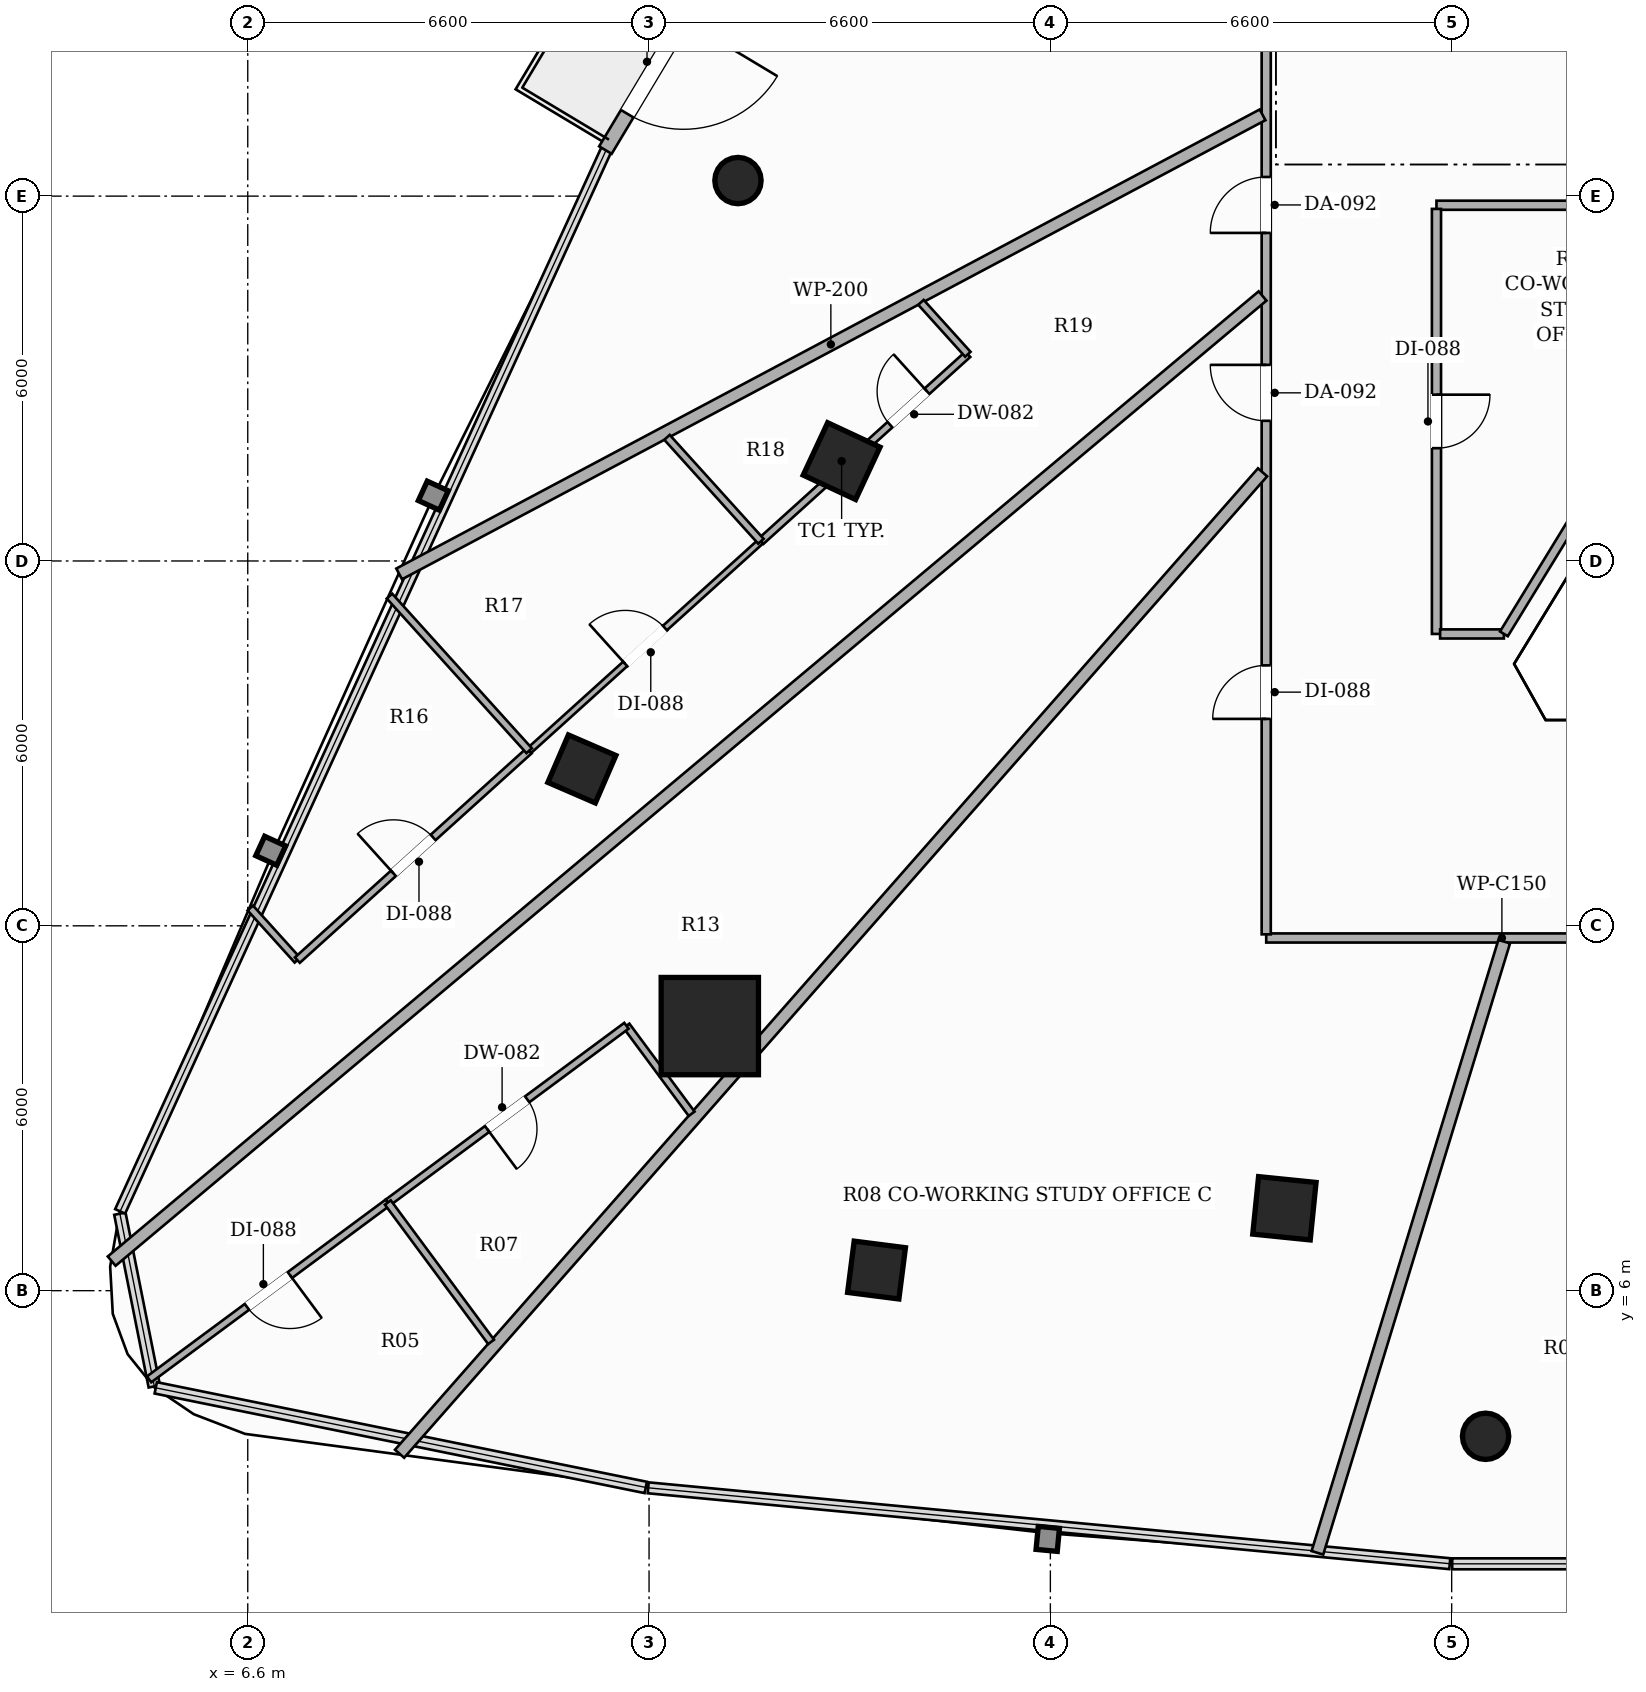
"""IFC4 building model, lengths in metres.
Left out: names, types, materials, properties, quantities, classifications, styles, units other than length and angle.
Written with IfcOpenShell. Run it as: python <this file> out.ifc"""

import sys

from ifc_helpers import new_model, si_unit, direction, frame, frame_2d, origin, origin_2d, place, context, subcontext, project, spatial, rectangle, hollow_rectangle, hollow_circle, extrude, element, fill, save


model = new_model("IFC4")
c1 = context("Model", 3, precision=1e-05, world=origin(), true_north=direction((0.0, 1.0)))
c2 = subcontext(c1, "Body", "Model", "MODEL_VIEW")
j1 = project(units=[si_unit("LENGTHUNIT", "METRE"), si_unit("PLANEANGLEUNIT", "RADIAN")], contexts=[c1])
p1 = place(None, origin())
s1 = spatial("IfcSite", under=j1, at=p1, CompositionType="ELEMENT")
p2 = place(p1, origin())
s2 = spatial("IfcBuilding", under=s1, at=p2, CompositionType="ELEMENT")
p3 = place(p2, frame((0.0, 0.0, 50.0)))
s3 = spatial("IfcBuildingStorey", under=s2, at=p3, CompositionType="ELEMENT", Elevation=50.0)
p4 = place(p3, frame((14.199, 10.351, 0.0), z_axis=(0.0, 0.0, 1.0), x_axis=(1.0, 0.0, 0.0)))
e1 = element("IfcColumn", 1, at=p4, inside=s3, PredefinedType="COLUMN", context=c2, shape_type="SweptSolid", body=[
    extrude(hollow_rectangle(XDim=1.6, YDim=1.6, WallThickness=0.05, at=origin_2d()), origin(), (0.0, 0.0, 1.0), 3.3),
])
for number, where, z_axis, x_axis in (
    (2, (16.367, 19.642, 0.0), (0.0, 0.0, 1.0), (0.423, 0.906, 0.0)),
    (3, (23.649, 7.355, 0.0), (0.0, 0.0, 1.0), (-0.995, 0.101, 0.0)),
):
    element("IfcColumn", number, at=place(p3, frame(where, z_axis=z_axis, x_axis=x_axis)), inside=s3, PredefinedType="COLUMN", context=c2, shape_type="SweptSolid", body=[
        extrude(hollow_rectangle(XDim=0.95, YDim=0.95, WallThickness=0.032, at=origin_2d()), origin(), (0.0, 0.0, 1.0), 3.3),
    ])
for number, where, z_axis, x_axis in (
    (4, (12.095, 14.58, 0.0), (0.0, 0.0, 1.0), (0.397, 0.918, 0.0)),
    (5, (16.941, 6.339, 0.0), (0.0, 0.0, 1.0), (-0.992, 0.127, 0.0)),
):
    element("IfcColumn", number, at=place(p3, frame(where, z_axis=z_axis, x_axis=x_axis)), inside=s3, PredefinedType="COLUMN", context=c2, shape_type="SweptSolid", body=[
        extrude(hollow_rectangle(XDim=0.85, YDim=0.85, WallThickness=0.028, at=origin_2d()), origin(), (0.0, 0.0, 1.0), 3.3),
    ])
for number, where, z_axis, x_axis in (
    (6, (14.662, 24.256, 0.0), (0.0, 0.0, 1.0), (1.0, 0.0, 0.0)),
    (7, (26.958, 3.605, 0.0), (0.0, 0.0, 1.0), (1.0, 0.0, 0.0)),
):
    element("IfcColumn", number, at=place(p3, frame(where, z_axis=z_axis, x_axis=x_axis)), inside=s3, PredefinedType="COLUMN", context=c2, shape_type="SweptSolid", body=[
        extrude(hollow_circle(Radius=0.381, WallThickness=0.022, at=origin_2d()), origin(), (0.0, 0.0, 1.0), 3.3),
    ])
p5 = place(p3, frame((19.162, 35.896, 0.0), z_axis=(0.0, 0.0, 1.0), x_axis=(-0.514316069528, -0.857600711652, 0.0)))
e8 = element("IfcWall", 8, at=p5, inside=s3, PredefinedType="SOLIDWALL", context=c2, shape_type="SweptSolid", body=[
    extrude(rectangle(XDim=12.989, YDim=0.24, at=frame_2d((6.494, 0.0))), origin(), (0.0, 0.0, 1.0), 2.624),
])
p6 = place(p5, frame((10.491, 0.0, 0.0)))
e9 = element("IfcOpeningElement", 9, at=p6, cuts=e8, PredefinedType="OPENING", context=c2, shape_type="SweptSolid", body=[
    extrude(rectangle(XDim=1.8, YDim=2.2, at=frame_2d((0.9, 1.1))), frame((0.0, 0.13, 0.0), z_axis=(0.0, -1.0, 0.0), x_axis=(1.0, 0.0, 0.0)), (0.0, 0.0, 1.0), 0.26),
])
p7 = place(p3, frame((42.59, 11.8, 0.0), z_axis=(0.0, 0.0, 1.0), x_axis=(-1.0, 0.0, 0.0)))
e10 = element("IfcWall", 10, at=p7, inside=s3, PredefinedType="PARTITIONING", context=c2, shape_type="SweptSolid", body=[
    extrude(rectangle(XDim=19.24, YDim=0.15, at=frame_2d((9.62, 0.0))), origin(), (0.0, 0.0, 1.0), 2.669),
])
p8 = place(p7, frame((10.508, 0.0, 0.0)))
e11 = element("IfcOpeningElement", 11, at=p8, cuts=e10, PredefinedType="OPENING", context=c2, shape_type="SweptSolid", body=[
    extrude(rectangle(XDim=0.88, YDim=2.1, at=frame_2d((0.44, 1.05))), frame((0.0, 0.085, 0.0), z_axis=(0.0, -1.0, 0.0), x_axis=(1.0, 0.0, 0.0)), (0.0, 0.0, 1.0), 0.17),
])
p9 = place(p7, frame((2.98, 0.0, 0.0)))
e12 = element("IfcOpeningElement", 12, at=p9, cuts=e10, PredefinedType="OPENING", context=c2, shape_type="SweptSolid", body=[
    extrude(rectangle(XDim=0.92, YDim=2.15, at=frame_2d((0.46, 1.075))), frame((0.0, 0.085, 0.0), z_axis=(0.0, -1.0, 0.0), x_axis=(1.0, 0.0, 0.0)), (0.0, 0.0, 1.0), 0.17),
])
p10 = place(p3, frame((23.35, 11.86, 0.0), z_axis=(0.0, 0.0, 1.0), x_axis=(0.0, 1.0, 0.0)))
e13 = element("IfcWall", 13, at=p10, inside=s3, PredefinedType="PARTITIONING", context=c2, shape_type="SweptSolid", body=[
    extrude(rectangle(XDim=25.04, YDim=0.15, at=frame_2d((12.52, 0.0))), origin(), (0.0, 0.0, 1.0), 2.413),
])
p11 = place(p10, frame((18.67, 0.0, 0.0)))
e14 = element("IfcOpeningElement", 14, at=p11, cuts=e13, PredefinedType="OPENING", context=c2, shape_type="SweptSolid", body=[
    extrude(rectangle(XDim=0.88, YDim=2.1, at=frame_2d((0.44, 1.05))), frame((0.0, 0.085, 0.0), z_axis=(0.0, -1.0, 0.0), x_axis=(1.0, 0.0, 0.0)), (0.0, 0.0, 1.0), 0.17),
])
p12 = place(p10, frame((3.543, 0.0, 0.0)))
e15 = element("IfcOpeningElement", 15, at=p12, cuts=e13, PredefinedType="OPENING", context=c2, shape_type="SweptSolid", body=[
    extrude(rectangle(XDim=0.88, YDim=2.1, at=frame_2d((0.44, 1.05))), frame((0.0, 0.085, 0.0), z_axis=(0.0, -1.0, 0.0), x_axis=(1.0, 0.0, 0.0)), (0.0, 0.0, 1.0), 0.17),
])
p13 = place(p10, frame((8.445, 0.0, 0.0)))
e16 = element("IfcOpeningElement", 16, at=p13, cuts=e13, PredefinedType="OPENING", context=c2, shape_type="SweptSolid", body=[
    extrude(rectangle(XDim=0.92, YDim=2.15, at=frame_2d((0.46, 1.075))), frame((0.0, 0.085, 0.0), z_axis=(0.0, -1.0, 0.0), x_axis=(1.0, 0.0, 0.0)), (0.0, 0.0, 1.0), 0.17),
])
p14 = place(p10, frame((11.535, 0.0, 0.0)))
e17 = element("IfcOpeningElement", 17, at=p14, cuts=e13, PredefinedType="OPENING", context=c2, shape_type="SweptSolid", body=[
    extrude(rectangle(XDim=0.92, YDim=2.15, at=frame_2d((0.46, 1.075))), frame((0.0, 0.085, 0.0), z_axis=(0.0, -1.0, 0.0), x_axis=(1.0, 0.0, 0.0)), (0.0, 0.0, 1.0), 0.17),
])
p15 = place(p3, frame((31.568, 23.85, 0.0), z_axis=(0.0, 0.0, 1.0), x_axis=(-1.0, 0.0, 0.0)))
e18 = element("IfcWall", 18, at=p15, inside=s3, PredefinedType="PARTITIONING", context=c2, shape_type="SweptSolid", body=[
    extrude(rectangle(XDim=5.418, YDim=0.15, at=frame_2d((2.709, 0.0))), origin(), (0.0, 0.0, 1.0), 2.669),
])
p16 = place(p3, frame((26.15, 23.79, 0.0), z_axis=(0.0, 0.0, 1.0), x_axis=(0.0, -1.0, 0.0)))
e19 = element("IfcWall", 19, at=p16, inside=s3, PredefinedType="PARTITIONING", context=c2, shape_type="SweptSolid", body=[
    extrude(rectangle(XDim=6.99, YDim=0.15, at=frame_2d((3.495, 0.0))), origin(), (0.0, 0.0, 1.0), 2.669),
])
p17 = place(p16, frame((3.055, 0.0, 0.0)))
e20 = element("IfcOpeningElement", 20, at=p17, cuts=e19, PredefinedType="OPENING", context=c2, shape_type="SweptSolid", body=[
    extrude(rectangle(XDim=0.88, YDim=2.1, at=frame_2d((0.44, 1.05))), frame((0.0, 0.085, 0.0), z_axis=(0.0, -1.0, 0.0), x_axis=(1.0, 0.0, 0.0)), (0.0, 0.0, 1.0), 0.17),
])
p18 = place(p3, frame((26.21, 16.8, 0.0), z_axis=(0.0, 0.0, 1.0), x_axis=(1.0, 0.0, 0.0)))
e21 = element("IfcWall", 21, at=p18, inside=s3, PredefinedType="PARTITIONING", context=c2, shape_type="SweptSolid", body=[
    extrude(rectangle(XDim=1.049, YDim=0.15, at=frame_2d((0.524, 0.0))), origin(), (0.0, 0.0, 1.0), 3.06),
])
p19 = place(p3, frame((27.259, 16.801, 0.0), z_axis=(0.0, 0.0, 1.0), x_axis=(0.522072924527, 0.852900850906, 0.0)))
e22 = element("IfcWall", 22, at=p19, inside=s3, PredefinedType="PARTITIONING", context=c2, shape_type="SweptSolid", body=[
    extrude(rectangle(XDim=8.194, YDim=0.15, at=frame_2d((4.097, 0.0))), origin(), (0.0, 0.0, 1.0), 2.669),
])
p20 = place(p3, frame((23.29, 25.337, 0.0), z_axis=(0.0, 0.0, 1.0), x_axis=(-0.882959018112, -0.469450074379, 0.0)))
e23 = element("IfcWall", 23, at=p20, inside=s3, PredefinedType="PARTITIONING", context=c2, shape_type="SweptSolid", body=[
    extrude(rectangle(XDim=16.082, YDim=0.2, at=frame_2d((8.041, 0.0))), origin(), (0.0, 0.0, 1.0), 2.413),
])
p21 = place(p3, frame((27.264, 11.74, 0.0), z_axis=(0.0, 0.0, 1.0), x_axis=(-0.292294665238, -0.956328305904, 0.0)))
e24 = element("IfcWall", 24, at=p21, inside=s3, PredefinedType="PARTITIONING", context=c2, shape_type="SweptSolid", body=[
    extrude(rectangle(XDim=10.51, YDim=0.2, at=frame_2d((5.255, 0.0))), origin(), (0.0, 0.0, 1.0), 2.413),
])
p22 = place(p3, frame((9.097, 3.318, 0.0), z_axis=(0.0, 0.0, 1.0), x_axis=(0.66036589704, 0.750943993935, 0.0)))
e25 = element("IfcWall", 25, at=p22, inside=s3, PredefinedType="PARTITIONING", context=c2, shape_type="SweptSolid", body=[
    extrude(rectangle(XDim=21.493, YDim=0.2, at=frame_2d((10.747, 0.0))), origin(), (0.0, 0.0, 1.0), 2.413),
])
p23 = place(p3, frame((4.362, 6.486, 0.0), z_axis=(0.0, 0.0, 1.0), x_axis=(0.766256370513, 0.642534959865, 0.0)))
e26 = element("IfcWall", 26, at=p23, inside=s3, PredefinedType="PARTITIONING", context=c2, shape_type="SweptSolid", body=[
    extrude(rectangle(XDim=24.702, YDim=0.2, at=frame_2d((12.351, 0.0))), origin(), (0.0, 0.0, 1.0), 2.413),
])
p24 = place(p3, frame((13.9, 8.909, 0.0), z_axis=(0.0, 0.0, 1.0), x_axis=(-0.595282665334, 0.803516364708, 0.0)))
e27 = element("IfcWall", 27, at=p24, inside=s3, PredefinedType="PARTITIONING", context=c2, shape_type="SweptSolid", body=[
    extrude(rectangle(XDim=1.801, YDim=0.12, at=frame_2d((0.9, 0.0))), origin(), (0.0, 0.0, 1.0), 3.06),
])
p25 = place(p3, frame((12.828, 10.356, 0.0), z_axis=(0.0, 0.0, 1.0), x_axis=(-0.803609449498, -0.595156998344, 0.0)))
e28 = element("IfcWall", 28, at=p25, inside=s3, PredefinedType="PARTITIONING", context=c2, shape_type="SweptSolid", body=[
    extrude(rectangle(XDim=4.883, YDim=0.12, at=frame_2d((2.441, 0.0))), origin(), (0.0, 0.0, 1.0), 2.619),
])
p26 = place(p25, frame((2.031, 0.0, 0.0)))
e29 = element("IfcOpeningElement", 29, at=p26, cuts=e28, PredefinedType="OPENING", context=c2, shape_type="SweptSolid", body=[
    extrude(rectangle(XDim=0.82, YDim=2.1, at=frame_2d((0.41, 1.05))), frame((0.0, 0.07, 0.0), z_axis=(0.0, -1.0, 0.0), x_axis=(1.0, 0.0, 0.0)), (0.0, 0.0, 1.0), 0.14),
])
p27 = place(p3, frame((8.904, 7.45, 0.0), z_axis=(0.0, 0.0, 1.0), x_axis=(-0.803552768464, -0.595233524168, 0.0)))
e30 = element("IfcWall", 30, at=p27, inside=s3, PredefinedType="PARTITIONING", context=c2, shape_type="SweptSolid", body=[
    extrude(rectangle(XDim=4.887, YDim=0.12, at=frame_2d((2.443, 0.0))), origin(), (0.0, 0.0, 1.0), 3.06),
])
p28 = place(p27, frame((2.004, 0.0, 0.0)))
e31 = element("IfcOpeningElement", 31, at=p28, cuts=e30, PredefinedType="OPENING", context=c2, shape_type="SweptSolid", body=[
    extrude(rectangle(XDim=0.88, YDim=2.1, at=frame_2d((0.44, 1.05))), frame((0.0, 0.07, 0.0), z_axis=(0.0, -1.0, 0.0), x_axis=(1.0, 0.0, 0.0)), (0.0, 0.0, 1.0), 0.14),
])
p29 = place(p3, frame((10.602, 5.158, 0.0), z_axis=(0.0, 0.0, 1.0), x_axis=(-0.595278721497, 0.803519286472, 0.0)))
e32 = element("IfcWall", 32, at=p29, inside=s3, PredefinedType="PARTITIONING", context=c2, shape_type="SweptSolid", body=[
    extrude(rectangle(XDim=2.853, YDim=0.12, at=frame_2d((1.426, 0.0))), origin(), (0.0, 0.0, 1.0), 3.06),
])
p30 = place(p3, frame((15.04, 18.324, 0.0), z_axis=(0.0, 0.0, 1.0), x_axis=(0.741971948415, 0.670430926916, 0.0)))
e33 = element("IfcWall", 33, at=p30, inside=s3, PredefinedType="PARTITIONING", context=c2, shape_type="SweptSolid", body=[
    extrude(rectangle(XDim=4.586, YDim=0.12, at=frame_2d((2.293, 0.0))), origin(), (0.0, 0.0, 1.0), 2.413),
])
p31 = place(p30, frame((2.86, 0.0, 0.0)))
e34 = element("IfcOpeningElement", 34, at=p31, cuts=e33, PredefinedType="OPENING", context=c2, shape_type="SweptSolid", body=[
    extrude(rectangle(XDim=0.82, YDim=2.1, at=frame_2d((0.41, 1.05))), frame((0.0, 0.07, 0.0), z_axis=(0.0, -1.0, 0.0), x_axis=(1.0, 0.0, 0.0)), (0.0, 0.0, 1.0), 0.14),
])
p32 = place(p3, frame((18.443, 21.399, 0.0), z_axis=(0.0, 0.0, 1.0), x_axis=(-0.670112835353, 0.742259245746, 0.0)))
e35 = element("IfcWall", 35, at=p32, inside=s3, PredefinedType="PARTITIONING", context=c2, shape_type="SweptSolid", body=[
    extrude(rectangle(XDim=1.151, YDim=0.12, at=frame_2d((0.575, 0.0))), origin(), (0.0, 0.0, 1.0), 2.669),
])
p33 = place(p3, frame((6.642, 12.293, 0.0), z_axis=(0.0, 0.0, 1.0), x_axis=(0.670248695606, -0.742136568321, 0.0)))
e36 = element("IfcWall", 36, at=p33, inside=s3, PredefinedType="PARTITIONING", context=c2, shape_type="SweptSolid", body=[
    extrude(rectangle(XDim=1.155, YDim=0.12, at=frame_2d((0.577, 0.0))), origin(), (0.0, 0.0, 1.0), 2.619),
])
p34 = place(p3, frame((7.416, 11.436, 0.0), z_axis=(0.0, 0.0, 1.0), x_axis=(0.742030958457, 0.670365614192, 0.0)))
e37 = element("IfcWall", 37, at=p34, inside=s3, PredefinedType="PARTITIONING", context=c2, shape_type="SweptSolid", body=[
    extrude(rectangle(XDim=5.137, YDim=0.12, at=frame_2d((2.569, 0.0))), origin(), (0.0, 0.0, 1.0), 2.619),
])
p35 = place(p34, frame((2.129, 0.0, 0.0)))
e38 = element("IfcOpeningElement", 38, at=p35, cuts=e37, PredefinedType="OPENING", context=c2, shape_type="SweptSolid", body=[
    extrude(rectangle(XDim=0.88, YDim=2.1, at=frame_2d((0.44, 1.05))), frame((0.0, 0.07, 0.0), z_axis=(0.0, -1.0, 0.0), x_axis=(1.0, 0.0, 0.0)), (0.0, 0.0, 1.0), 0.14),
])
p36 = place(p3, frame((11.228, 14.88, 0.0), z_axis=(0.0, 0.0, 1.0), x_axis=(0.742007319068, 0.670391779819, 0.0)))
e39 = element("IfcWall", 39, at=p36, inside=s3, PredefinedType="PARTITIONING", context=c2, shape_type="SweptSolid", body=[
    extrude(rectangle(XDim=5.137, YDim=0.1, at=frame_2d((2.569, 0.0))), origin(), (0.0, 0.0, 1.0), 2.413),
])
p37 = place(p36, frame((2.129, 0.0, 0.0)))
e40 = element("IfcOpeningElement", 40, at=p37, cuts=e39, PredefinedType="OPENING", context=c2, shape_type="SweptSolid", body=[
    extrude(rectangle(XDim=0.88, YDim=2.1, at=frame_2d((0.44, 1.05))), frame((0.0, 0.06, 0.0), z_axis=(0.0, -1.0, 0.0), x_axis=(1.0, 0.0, 0.0)), (0.0, 0.0, 1.0), 0.12),
])
p38 = place(p3, frame((15.04, 18.324, 0.0), z_axis=(0.0, 0.0, 1.0), x_axis=(-0.670602478911, 0.741816901451, 0.0)))
e41 = element("IfcWall", 41, at=p38, inside=s3, PredefinedType="PARTITIONING", context=c2, shape_type="SweptSolid", body=[
    extrude(rectangle(XDim=2.304, YDim=0.12, at=frame_2d((1.152, 0.0))), origin(), (0.0, 0.0, 1.0), 2.413),
])
p39 = place(p3, frame((8.931, 17.422, 0.0), z_axis=(0.0, 0.0, 1.0), x_axis=(0.670431816202, -0.741971144873, 0.0)))
e42 = element("IfcWall", 42, at=p39, inside=s3, PredefinedType="PARTITIONING", context=c2, shape_type="SweptSolid", body=[
    extrude(rectangle(XDim=3.426, YDim=0.12, at=frame_2d((1.713, 0.0))), origin(), (0.0, 0.0, 1.0), 3.06),
])
p40 = place(p6, origin())
e43 = element("IfcDoor", 43, at=p40, inside=s3, OperationType="SINGLE_SWING_LEFT", PredefinedType="DOOR", context=c2, shape_type="SweptSolid", body=[
    extrude(rectangle(XDim=1.8, YDim=2.2, at=frame_2d((0.9, 1.1))), frame((0.0, 0.025, 0.0), z_axis=(0.0, -1.0, 0.0), x_axis=(1.0, 0.0, 0.0)), (0.0, 0.0, 1.0), 0.05),
])
fill(e9, e43)
p41 = place(p12, origin())
e44 = element("IfcDoor", 44, at=p41, inside=s3, OperationType="SINGLE_SWING_LEFT", PredefinedType="DOOR", context=c2, shape_type="SweptSolid", body=[
    extrude(rectangle(XDim=0.88, YDim=2.1, at=frame_2d((0.44, 1.05))), frame((0.0, 0.025, 0.0), z_axis=(0.0, -1.0, 0.0), x_axis=(1.0, 0.0, 0.0)), (0.0, 0.0, 1.0), 0.05),
])
fill(e15, e44)
p42 = place(p13, origin())
e45 = element("IfcDoor", 45, at=p42, inside=s3, OperationType="SINGLE_SWING_RIGHT", PredefinedType="DOOR", context=c2, shape_type="SweptSolid", body=[
    extrude(rectangle(XDim=0.92, YDim=2.15, at=frame_2d((0.46, 1.075))), frame((0.0, 0.025, 0.0), z_axis=(0.0, -1.0, 0.0), x_axis=(1.0, 0.0, 0.0)), (0.0, 0.0, 1.0), 0.05),
])
fill(e16, e45)
p43 = place(p26, origin())
e46 = element("IfcDoor", 46, at=p43, inside=s3, OperationType="SINGLE_SWING_RIGHT", PredefinedType="DOOR", context=c2, shape_type="SweptSolid", body=[
    extrude(rectangle(XDim=0.82, YDim=2.1, at=frame_2d((0.41, 1.05))), frame((0.0, 0.025, 0.0), z_axis=(0.0, -1.0, 0.0), x_axis=(1.0, 0.0, 0.0)), (0.0, 0.0, 1.0), 0.05),
])
fill(e29, e46)
p44 = place(p28, origin())
e47 = element("IfcDoor", 47, at=p44, inside=s3, OperationType="SINGLE_SWING_LEFT", PredefinedType="DOOR", context=c2, shape_type="SweptSolid", body=[
    extrude(rectangle(XDim=0.88, YDim=2.1, at=frame_2d((0.44, 1.05))), frame((0.0, 0.025, 0.0), z_axis=(0.0, -1.0, 0.0), x_axis=(1.0, 0.0, 0.0)), (0.0, 0.0, 1.0), 0.05),
])
fill(e31, e47)
p45 = place(p14, origin())
e48 = element("IfcDoor", 48, at=p45, inside=s3, OperationType="SINGLE_SWING_LEFT", PredefinedType="DOOR", context=c2, shape_type="SweptSolid", body=[
    extrude(rectangle(XDim=0.92, YDim=2.15, at=frame_2d((0.46, 1.075))), frame((0.0, 0.025, 0.0), z_axis=(0.0, -1.0, 0.0), x_axis=(1.0, 0.0, 0.0)), (0.0, 0.0, 1.0), 0.05),
])
fill(e17, e48)
p46 = place(p31, origin())
e49 = element("IfcDoor", 49, at=p46, inside=s3, OperationType="SINGLE_SWING_RIGHT", PredefinedType="DOOR", context=c2, shape_type="SweptSolid", body=[
    extrude(rectangle(XDim=0.82, YDim=2.1, at=frame_2d((0.41, 1.05))), frame((0.0, 0.025, 0.0), z_axis=(0.0, -1.0, 0.0), x_axis=(1.0, 0.0, 0.0)), (0.0, 0.0, 1.0), 0.05),
])
fill(e34, e49)
p47 = place(p35, origin())
e50 = element("IfcDoor", 50, at=p47, inside=s3, OperationType="SINGLE_SWING_LEFT", PredefinedType="DOOR", context=c2, shape_type="SweptSolid", body=[
    extrude(rectangle(XDim=0.88, YDim=2.1, at=frame_2d((0.44, 1.05))), frame((0.0, 0.025, 0.0), z_axis=(0.0, -1.0, 0.0), x_axis=(1.0, 0.0, 0.0)), (0.0, 0.0, 1.0), 0.05),
])
fill(e38, e50)
p48 = place(p37, origin())
e51 = element("IfcDoor", 51, at=p48, inside=s3, OperationType="SINGLE_SWING_LEFT", PredefinedType="DOOR", context=c2, shape_type="SweptSolid", body=[
    extrude(rectangle(XDim=0.88, YDim=2.1, at=frame_2d((0.44, 1.05))), frame((0.0, 0.025, 0.0), z_axis=(0.0, -1.0, 0.0), x_axis=(1.0, 0.0, 0.0)), (0.0, 0.0, 1.0), 0.05),
])
fill(e40, e51)
p49 = place(p17, origin())
e52 = element("IfcDoor", 52, at=p49, inside=s3, OperationType="SINGLE_SWING_LEFT", PredefinedType="DOOR", context=c2, shape_type="SweptSolid", body=[
    extrude(rectangle(XDim=0.88, YDim=2.1, at=frame_2d((0.44, 1.05))), frame((0.0, 0.025, 0.0), z_axis=(0.0, -1.0, 0.0), x_axis=(1.0, 0.0, 0.0)), (0.0, 0.0, 1.0), 0.05),
])
fill(e20, e52)
save(model, sys.argv[1])
